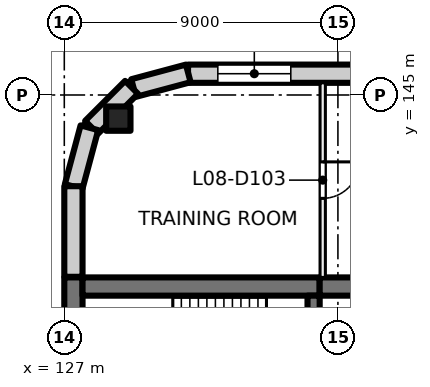
"""IFC4 building model, lengths in metres.
Left out: names, types, materials, properties, quantities, classifications, styles, units other than length and angle.
Written with IfcOpenShell. Run it as: python <this file> out.ifc"""

import sys

from ifc_helpers import new_model, si_unit, direction, frame, frame_2d, origin, origin_2d, place, context, subcontext, project, spatial, rectangle, extrude, element, fill, save


model = new_model("IFC4")
c1 = context("Model", 3, precision=1e-05, world=origin(), true_north=direction((0.0, 1.0)))
c2 = subcontext(c1, "Body", "Model", "MODEL_VIEW")
j1 = project(units=[si_unit("LENGTHUNIT", "METRE"), si_unit("PLANEANGLEUNIT", "RADIAN")], contexts=[c1])
p1 = place(None, origin())
s1 = spatial("IfcSite", under=j1, at=p1, CompositionType="ELEMENT")
p2 = place(p1, origin())
s2 = spatial("IfcBuilding", under=s1, at=p2, CompositionType="ELEMENT")
p3 = place(p2, frame((0.0, 0.0, 39.5)))
s3 = spatial("IfcBuildingStorey", under=s2, at=p3, CompositionType="ELEMENT", Elevation=39.5)
p4 = place(p3, frame((128.777, 144.223, 0.0), z_axis=(0.0, 0.0, 1.0), x_axis=(1.0, 0.0, 0.0)))
e1 = element("IfcColumn", 1, at=p4, inside=s3, PredefinedType="COLUMN", context=c2, shape_type="SweptSolid", body=[
    extrude(rectangle(XDim=0.8, YDim=0.8, at=origin_2d()), origin(), (0.0, 0.0, 1.0), 4.0),
])
p5 = place(p3, frame((127.3, 135.2, 0.0), z_axis=(0.0, 0.0, 1.0), x_axis=(0.0, 1.0, 0.0)))
e2 = element("IfcWall", 2, at=p5, inside=s3, PredefinedType="SHEAR", context=c2, shape_type="SweptSolid", body=[
    extrude(rectangle(XDim=3.8, YDim=0.6, at=frame_2d((1.9, 0.0))), origin(), (0.0, 0.0, 1.0), 4.0),
])
p6 = place(p3, frame((127.6, 138.7, 0.0), z_axis=(0.0, 0.0, 1.0), x_axis=(1.0, 0.0, 0.0)))
e3 = element("IfcWall", 3, at=p6, inside=s3, PredefinedType="SHEAR", context=c2, shape_type="SweptSolid", body=[
    extrude(rectangle(XDim=7.8, YDim=0.6, at=frame_2d((3.9, 0.0))), origin(), (0.0, 0.0, 1.0), 4.0),
])
p7 = place(p3, frame((135.4, 138.7, 0.0), z_axis=(0.0, 0.0, 1.0), x_axis=(1.0, 0.0, 0.0)))
e4 = element("IfcWall", 4, at=p7, inside=s3, PredefinedType="SHEAR", context=c2, shape_type="SweptSolid", body=[
    extrude(rectangle(XDim=4.6, YDim=0.6, at=frame_2d((2.3, 0.0))), origin(), (0.0, 0.0, 1.0), 4.0),
])
p8 = place(p3, frame((135.2, 135.6, 0.0), z_axis=(0.0, 0.0, 1.0), x_axis=(0.0, 1.0, 0.0)))
e5 = element("IfcWall", 5, at=p8, inside=s3, PredefinedType="SHEAR", context=c2, shape_type="SweptSolid", body=[
    extrude(rectangle(XDim=2.8, YDim=0.4, at=frame_2d((1.4, 0.0))), origin(), (0.0, 0.0, 1.0), 4.0),
])
p9 = place(p8, frame((0.9, 0.0, 0.0)))
e6 = element("IfcOpeningElement", 6, at=p9, cuts=e5, PredefinedType="OPENING", context=c2, shape_type="SweptSolid", body=[
    extrude(rectangle(XDim=1.0, YDim=2.1, at=frame_2d((0.5, 1.05))), frame((0.0, 0.21, 0.0), z_axis=(0.0, -1.0, 0.0), x_axis=(1.0, 0.0, 0.0)), (0.0, 0.0, 1.0), 0.42),
])
p10 = place(p3, frame((131.07, 145.7, 0.0), z_axis=(0.0, 0.0, 1.0), x_axis=(1.0, 0.0, 0.0)))
e7 = element("IfcWall", 7, at=p10, inside=s3, PredefinedType="SOLIDWALL", context=c2, shape_type="SweptSolid", body=[
    extrude(rectangle(XDim=31.93, YDim=0.6, at=frame_2d((15.965, 0.0))), origin(), (0.0, 0.0, 1.0), 3.625),
])
p11 = place(p10, frame((0.98, 0.0, 0.9)))
e8 = element("IfcOpeningElement", 8, at=p11, cuts=e7, PredefinedType="OPENING", context=c2, shape_type="SweptSolid", body=[
    extrude(rectangle(XDim=2.4, YDim=2.4, at=frame_2d((1.2, 1.2))), frame((0.0, 0.31, 0.0), z_axis=(0.0, -1.0, 0.0), x_axis=(1.0, 0.0, 0.0)), (0.0, 0.0, 1.0), 0.62),
])
p12 = place(p10, frame((5.48, 0.0, 0.9)))
e9 = element("IfcOpeningElement", 9, at=p12, cuts=e7, PredefinedType="OPENING", context=c2, shape_type="SweptSolid", body=[
    extrude(rectangle(XDim=2.4, YDim=2.4, at=frame_2d((1.2, 1.2))), frame((0.0, 0.31, 0.0), z_axis=(0.0, -1.0, 0.0), x_axis=(1.0, 0.0, 0.0)), (0.0, 0.0, 1.0), 0.62),
])
p13 = place(p10, frame((9.98, 0.0, 0.9)))
e10 = element("IfcOpeningElement", 10, at=p13, cuts=e7, PredefinedType="OPENING", context=c2, shape_type="SweptSolid", body=[
    extrude(rectangle(XDim=2.4, YDim=2.4, at=frame_2d((1.2, 1.2))), frame((0.0, 0.31, 0.0), z_axis=(0.0, -1.0, 0.0), x_axis=(1.0, 0.0, 0.0)), (0.0, 0.0, 1.0), 0.62),
])
p14 = place(p10, frame((14.48, 0.0, 0.9)))
e11 = element("IfcOpeningElement", 11, at=p14, cuts=e7, PredefinedType="OPENING", context=c2, shape_type="SweptSolid", body=[
    extrude(rectangle(XDim=2.4, YDim=2.4, at=frame_2d((1.2, 1.2))), frame((0.0, 0.31, 0.0), z_axis=(0.0, -1.0, 0.0), x_axis=(1.0, 0.0, 0.0)), (0.0, 0.0, 1.0), 0.62),
])
p15 = place(p10, frame((18.98, 0.0, 0.9)))
e12 = element("IfcOpeningElement", 12, at=p15, cuts=e7, PredefinedType="OPENING", context=c2, shape_type="SweptSolid", body=[
    extrude(rectangle(XDim=2.4, YDim=2.4, at=frame_2d((1.2, 1.2))), frame((0.0, 0.31, 0.0), z_axis=(0.0, -1.0, 0.0), x_axis=(1.0, 0.0, 0.0)), (0.0, 0.0, 1.0), 0.62),
])
p16 = place(p10, frame((23.48, 0.0, 0.9)))
e13 = element("IfcOpeningElement", 13, at=p16, cuts=e7, PredefinedType="OPENING", context=c2, shape_type="SweptSolid", body=[
    extrude(rectangle(XDim=2.4, YDim=2.4, at=frame_2d((1.2, 1.2))), frame((0.0, 0.31, 0.0), z_axis=(0.0, -1.0, 0.0), x_axis=(1.0, 0.0, 0.0)), (0.0, 0.0, 1.0), 0.62),
])
p17 = place(p10, frame((27.98, 0.0, 0.9)))
e14 = element("IfcOpeningElement", 14, at=p17, cuts=e7, PredefinedType="OPENING", context=c2, shape_type="SweptSolid", body=[
    extrude(rectangle(XDim=2.4, YDim=2.4, at=frame_2d((1.2, 1.2))), frame((0.0, 0.31, 0.0), z_axis=(0.0, -1.0, 0.0), x_axis=(1.0, 0.0, 0.0)), (0.0, 0.0, 1.0), 0.62),
])
for number, where, z_axis, x_axis in (
    (15, (129.281, 145.229, 0.0), (0.0, 0.0, 1.0), (0.966, 0.259, 0.0)),
    (16, (127.896, 143.936, 0.0), (0.0, 0.0, 1.0), (0.707, 0.707, 0.0)),
):
    element("IfcWall", number, at=place(p3, frame(where, z_axis=z_axis, x_axis=x_axis)), inside=s3, PredefinedType="SOLIDWALL", context=c2, shape_type="SweptSolid", body=[
        extrude(rectangle(XDim=1.861, YDim=0.6, at=frame_2d((0.93, 0.0))), origin(), (0.0, 0.0, 1.0), 3.625),
    ])
p18 = place(p3, frame((127.308, 141.99, 0.0), z_axis=(0.0, 0.0, 1.0), x_axis=(0.258839784042, 0.965920269068, 0.0)))
e17 = element("IfcWall", 17, at=p18, inside=s3, PredefinedType="SOLIDWALL", context=c2, shape_type="SweptSolid", body=[
    extrude(rectangle(XDim=2.0, YDim=0.6, at=frame_2d((1.0, 0.0))), origin(), (0.0, 0.0, 1.0), 3.625),
])
p19 = place(p3, frame((127.3, 139.02, 0.0), z_axis=(0.0, 0.0, 1.0), x_axis=(0.0, 1.0, 0.0)))
e18 = element("IfcWall", 18, at=p19, inside=s3, PredefinedType="SOLIDWALL", context=c2, shape_type="SweptSolid", body=[
    extrude(rectangle(XDim=2.98, YDim=0.6, at=frame_2d((1.49, 0.0))), origin(), (0.0, 0.0, 1.0), 3.625),
])
p20 = place(p3, frame((135.5, 145.4, 0.0), z_axis=(0.0, 0.0, 1.0), x_axis=(0.0, -1.0, 0.0)))
e19 = element("IfcWall", 19, at=p20, inside=s3, PredefinedType="PARTITIONING", context=c2, shape_type="SweptSolid", body=[
    extrude(rectangle(XDim=6.4, YDim=0.175, at=frame_2d((3.2, 0.0))), origin(), (0.0, 0.0, 1.0), 3.625),
])
p21 = place(p20, frame((2.6, 0.0, 0.0)))
e20 = element("IfcOpeningElement", 20, at=p21, cuts=e19, PredefinedType="OPENING", context=c2, shape_type="SweptSolid", body=[
    extrude(rectangle(XDim=1.2, YDim=2.1, at=frame_2d((0.6, 1.05))), frame((0.0, 0.097, 0.0), z_axis=(0.0, -1.0, 0.0), x_axis=(1.0, 0.0, 0.0)), (0.0, 0.0, 1.0), 0.195),
])
p22 = place(p11, origin())
e21 = element("IfcWindow", 21, at=p22, inside=s3, PartitioningType="SINGLE_PANEL", PredefinedType="WINDOW", context=c2, shape_type="SweptSolid", body=[
    extrude(rectangle(XDim=2.4, YDim=2.4, at=frame_2d((1.2, 1.2))), frame((0.0, 0.03, 0.0), z_axis=(0.0, -1.0, 0.0), x_axis=(1.0, 0.0, 0.0)), (0.0, 0.0, 1.0), 0.06),
])
fill(e8, e21)
p23 = place(p21, origin())
e22 = element("IfcDoor", 22, at=p23, inside=s3, OperationType="DOUBLE_DOOR_SINGLE_SWING", PredefinedType="DOOR", context=c2, shape_type="SweptSolid", body=[
    extrude(rectangle(XDim=1.2, YDim=2.1, at=frame_2d((0.6, 1.05))), frame((0.0, 0.025, 0.0), z_axis=(0.0, -1.0, 0.0), x_axis=(1.0, 0.0, 0.0)), (0.0, 0.0, 1.0), 0.05),
])
fill(e20, e22)
save(model, sys.argv[1])
